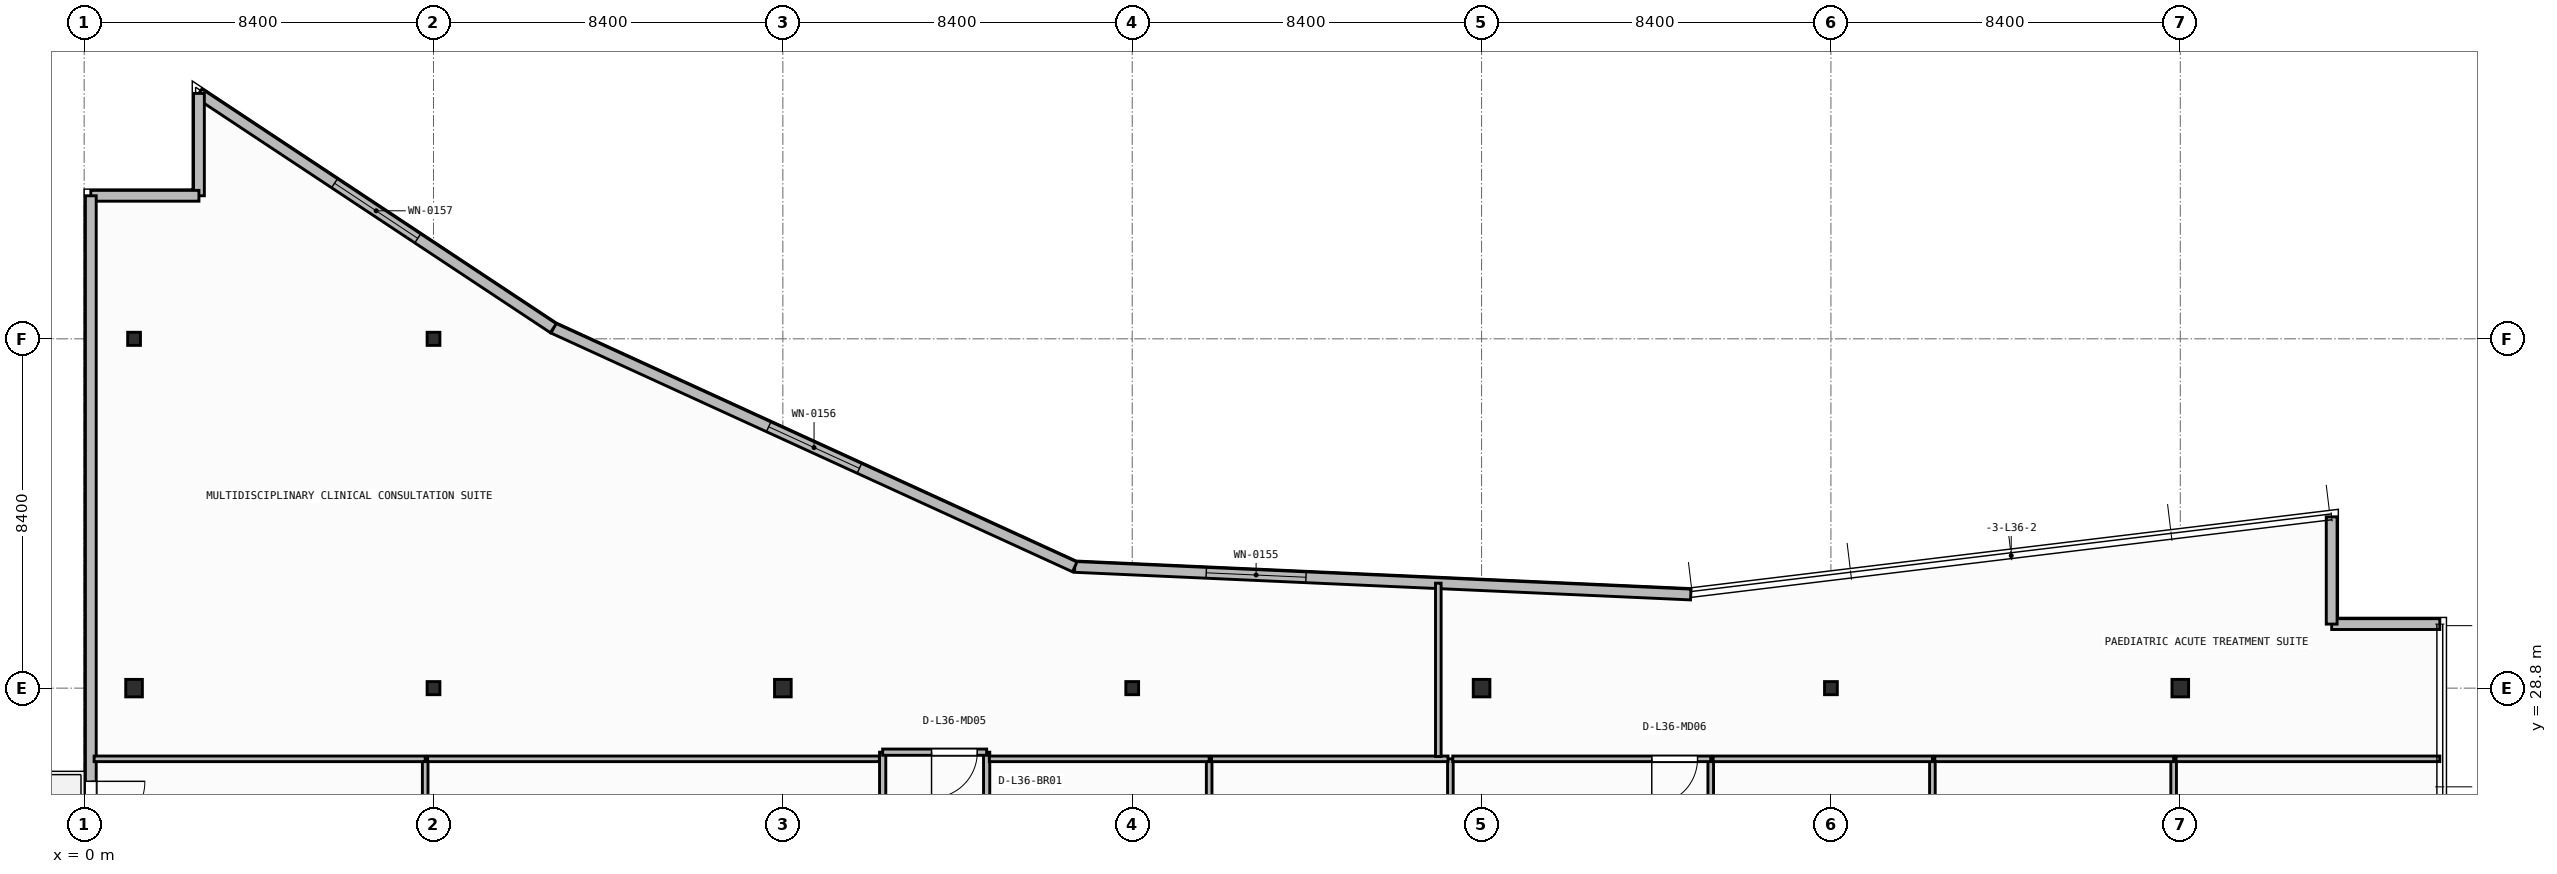
"""IFC4 building model, lengths in metres.
Left out: names, types, materials, properties, quantities, classifications, styles, units other than length and angle.
Written with IfcOpenShell. Run it as: python <this file> out.ifc"""

import sys

from ifc_helpers import new_model, si_unit, direction, frame, frame_2d, origin, origin_2d, place, context, subcontext, project, spatial, rectangle, i_section, extrude, element, fill, save


model = new_model("IFC4")
c1 = context("Model", 3, precision=1e-05, world=origin(), true_north=direction((0.0, 1.0)))
c2 = subcontext(c1, "Body", "Model", "MODEL_VIEW")
j1 = project(units=[si_unit("LENGTHUNIT", "METRE"), si_unit("PLANEANGLEUNIT", "RADIAN")], contexts=[c1])
p1 = place(None, origin())
s1 = spatial("IfcSite", under=j1, at=p1, CompositionType="ELEMENT")
p2 = place(p1, origin())
s2 = spatial("IfcBuilding", under=s1, at=p2, CompositionType="ELEMENT")
p3 = place(p2, frame((0.0, 0.0, 146.8)))
s3 = spatial("IfcBuildingStorey", under=s2, at=p3, CompositionType="ELEMENT", Elevation=146.8)
p4 = place(p3, frame((1.2, 28.8, 0.0), z_axis=(0.0, 0.0, 1.0), x_axis=(1.0, 0.0, 0.0)))
e1 = element("IfcColumn", 1, at=p4, inside=s3, PredefinedType="COLUMN", context=c2, shape_type="SweptSolid", body=[
    extrude(i_section(OverallWidth=0.4, OverallDepth=0.42, WebThickness=0.025, FlangeThickness=0.04, at=origin_2d()), origin(), (0.0, 0.0, 1.0), 3.95),
])
p5 = place(p3, frame((8.4, 28.8, 0.0), z_axis=(0.0, 0.0, 1.0), x_axis=(1.0, 0.0, 0.0)))
e2 = element("IfcColumn", 2, at=p5, inside=s3, PredefinedType="COLUMN", context=c2, shape_type="SweptSolid", body=[
    extrude(i_section(OverallWidth=0.307, OverallDepth=0.315, WebThickness=0.012, FlangeThickness=0.019, FilletRadius=0.017, at=origin_2d()), origin(), (0.0, 0.0, 1.0), 3.95),
])
p6 = place(p3, frame((16.8, 28.8, 0.0), z_axis=(0.0, 0.0, 1.0), x_axis=(1.0, 0.0, 0.0)))
e3 = element("IfcColumn", 3, at=p6, inside=s3, PredefinedType="COLUMN", context=c2, shape_type="SweptSolid", body=[
    extrude(i_section(OverallWidth=0.4, OverallDepth=0.42, WebThickness=0.025, FlangeThickness=0.04, at=origin_2d()), origin(), (0.0, 0.0, 1.0), 3.95),
])
p7 = place(p3, frame((25.2, 28.8, 0.0), z_axis=(0.0, 0.0, 1.0), x_axis=(1.0, 0.0, 0.0)))
e4 = element("IfcColumn", 4, at=p7, inside=s3, PredefinedType="COLUMN", context=c2, shape_type="SweptSolid", body=[
    extrude(i_section(OverallWidth=0.307, OverallDepth=0.315, WebThickness=0.012, FlangeThickness=0.019, FilletRadius=0.017, at=origin_2d()), origin(), (0.0, 0.0, 1.0), 3.95),
])
p8 = place(p3, frame((33.6, 28.8, 0.0), z_axis=(0.0, 0.0, 1.0), x_axis=(1.0, 0.0, 0.0)))
e5 = element("IfcColumn", 5, at=p8, inside=s3, PredefinedType="COLUMN", context=c2, shape_type="SweptSolid", body=[
    extrude(i_section(OverallWidth=0.4, OverallDepth=0.42, WebThickness=0.025, FlangeThickness=0.04, at=origin_2d()), origin(), (0.0, 0.0, 1.0), 3.95),
])
p9 = place(p3, frame((42.0, 28.8, 0.0), z_axis=(0.0, 0.0, 1.0), x_axis=(1.0, 0.0, 0.0)))
e6 = element("IfcColumn", 6, at=p9, inside=s3, PredefinedType="COLUMN", context=c2, shape_type="SweptSolid", body=[
    extrude(i_section(OverallWidth=0.307, OverallDepth=0.315, WebThickness=0.012, FlangeThickness=0.019, FilletRadius=0.017, at=origin_2d()), origin(), (0.0, 0.0, 1.0), 3.95),
])
p10 = place(p3, frame((50.4, 28.8, 0.0), z_axis=(0.0, 0.0, 1.0), x_axis=(1.0, 0.0, 0.0)))
e7 = element("IfcColumn", 7, at=p10, inside=s3, PredefinedType="COLUMN", context=c2, shape_type="SweptSolid", body=[
    extrude(i_section(OverallWidth=0.4, OverallDepth=0.42, WebThickness=0.025, FlangeThickness=0.04, at=origin_2d()), origin(), (0.0, 0.0, 1.0), 3.95),
])
for number, where, z_axis, x_axis in (
    (8, (1.2, 37.2, 0.0), (0.0, 0.0, 1.0), (1.0, 0.0, 0.0)),
    (9, (8.4, 37.2, 0.0), (0.0, 0.0, 1.0), (1.0, 0.0, 0.0)),
):
    element("IfcColumn", number, at=place(p3, frame(where, z_axis=z_axis, x_axis=x_axis)), inside=s3, PredefinedType="COLUMN", context=c2, shape_type="SweptSolid", body=[
        extrude(i_section(OverallWidth=0.307, OverallDepth=0.315, WebThickness=0.012, FlangeThickness=0.019, FilletRadius=0.017, at=origin_2d()), origin(), (0.0, 0.0, 1.0), 3.95),
    ])
p11 = place(p3, frame((56.64, 30.34, 0.0), z_axis=(0.0, 0.0, 1.0), x_axis=(-1.0, 0.0, 0.0)))
e10 = element("IfcWall", 10, at=p11, inside=s3, PredefinedType="STANDARD", context=c2, shape_type="SweptSolid", body=[
    extrude(rectangle(XDim=2.6, YDim=0.26, at=frame_2d((1.3, 0.0))), origin(), (0.0, 0.0, 1.0), 3.71),
])
p12 = place(p3, frame((54.04, 30.34, 0.0), z_axis=(0.0, 0.0, 1.0), x_axis=(0.0, 1.0, 0.0)))
e11 = element("IfcWall", 11, at=p12, inside=s3, PredefinedType="STANDARD", context=c2, shape_type="SweptSolid", body=[
    extrude(rectangle(XDim=2.579, YDim=0.26, at=frame_2d((1.29, 0.0))), origin(), (0.0, 0.0, 1.0), 3.71),
])
p13 = place(p3, frame((38.63, 31.052, 0.0), z_axis=(0.0, 0.0, 1.0), x_axis=(-0.998996592956, 0.044786239663, 0.0)))
e12 = element("IfcWall", 12, at=p13, inside=s3, PredefinedType="STANDARD", context=c2, shape_type="SweptSolid", body=[
    extrude(rectangle(XDim=14.827, YDim=0.26, at=frame_2d((7.414, 0.0))), origin(), (0.0, 0.0, 1.0), 3.71),
])
p14 = place(p13, frame((9.262, 0.0, 0.9)))
e13 = element("IfcOpeningElement", 13, at=p14, cuts=e12, PredefinedType="OPENING", context=c2, shape_type="SweptSolid", body=[
    extrude(rectangle(XDim=2.4, YDim=1.65, at=frame_2d((1.2, 0.825))), frame((0.0, 0.14, 0.0), z_axis=(0.0, -1.0, 0.0), x_axis=(1.0, 0.0, 0.0)), (0.0, 0.0, 1.0), 0.28),
])
p15 = place(p3, frame((23.818, 31.716, 0.0), z_axis=(0.0, 0.0, 1.0), x_axis=(-0.909209527513, 0.416338846471, 0.0)))
e14 = element("IfcWall", 14, at=p15, inside=s3, PredefinedType="STANDARD", context=c2, shape_type="SweptSolid", body=[
    extrude(rectangle(XDim=13.787, YDim=0.26, at=frame_2d((6.894, 0.0))), origin(), (0.0, 0.0, 1.0), 3.71),
])
p16 = place(p15, frame((5.694, 0.0, 0.9)))
e15 = element("IfcOpeningElement", 15, at=p16, cuts=e14, PredefinedType="OPENING", context=c2, shape_type="SweptSolid", body=[
    extrude(rectangle(XDim=2.4, YDim=1.65, at=frame_2d((1.2, 0.825))), frame((0.0, 0.14, 0.0), z_axis=(0.0, -1.0, 0.0), x_axis=(1.0, 0.0, 0.0)), (0.0, 0.0, 1.0), 0.28),
])
p17 = place(p3, frame((11.282, 37.456, 0.0), z_axis=(0.0, 0.0, 1.0), x_axis=(-0.833630474253, 0.552322580017, 0.0)))
e16 = element("IfcWall", 16, at=p17, inside=s3, PredefinedType="STANDARD", context=c2, shape_type="SweptSolid", body=[
    extrude(rectangle(XDim=10.223, YDim=0.26, at=frame_2d((5.111, 0.0))), origin(), (0.0, 0.0, 1.0), 3.71),
])
p18 = place(p17, frame((3.911, 0.0, 0.9)))
e17 = element("IfcOpeningElement", 17, at=p18, cuts=e16, PredefinedType="OPENING", context=c2, shape_type="SweptSolid", body=[
    extrude(rectangle(XDim=2.4, YDim=1.65, at=frame_2d((1.2, 0.825))), frame((0.0, 0.14, 0.0), z_axis=(0.0, -1.0, 0.0), x_axis=(1.0, 0.0, 0.0)), (0.0, 0.0, 1.0), 0.28),
])
p19 = place(p3, frame((2.76, 43.102, 0.0), z_axis=(0.0, 0.0, 1.0), x_axis=(0.0, -1.0, 0.0)))
e18 = element("IfcWall", 18, at=p19, inside=s3, PredefinedType="STANDARD", context=c2, shape_type="SweptSolid", body=[
    extrude(rectangle(XDim=2.462, YDim=0.26, at=frame_2d((1.231, 0.0))), origin(), (0.0, 0.0, 1.0), 3.71),
])
p20 = place(p3, frame((2.76, 40.64, 0.0), z_axis=(0.0, 0.0, 1.0), x_axis=(-1.0, 0.0, 0.0)))
e19 = element("IfcWall", 19, at=p20, inside=s3, PredefinedType="STANDARD", context=c2, shape_type="SweptSolid", body=[
    extrude(rectangle(XDim=2.6, YDim=0.26, at=frame_2d((1.3, 0.0))), origin(), (0.0, 0.0, 1.0), 3.71),
])
p21 = place(p3, frame((0.16, 40.64, 0.0), z_axis=(0.0, 0.0, 1.0), x_axis=(0.0, -1.0, 0.0)))
e20 = element("IfcWall", 20, at=p21, inside=s3, PredefinedType="STANDARD", context=c2, shape_type="SweptSolid", body=[
    extrude(rectangle(XDim=37.88, YDim=0.26, at=frame_2d((18.94, 0.0))), origin(), (0.0, 0.0, 1.0), 3.71),
])
p22 = place(p21, frame((14.081, 0.0, 0.0)))
e21 = element("IfcOpeningElement", 21, at=p22, cuts=e20, PredefinedType="OPENING", context=c2, shape_type="SweptSolid", body=[
    extrude(rectangle(XDim=1.3, YDim=2.15, at=frame_2d((0.65, 1.075))), frame((0.0, 0.14, 0.0), z_axis=(0.0, -1.0, 0.0), x_axis=(1.0, 0.0, 0.0)), (0.0, 0.0, 1.0), 0.28),
])
p23 = place(p3, frame((19.2, 27.26, 0.0), z_axis=(0.0, 0.0, 1.0), x_axis=(0.0, -1.0, 0.0)))
e22 = element("IfcWall", 22, at=p23, inside=s3, PredefinedType="PARTITIONING", context=c2, shape_type="SweptSolid", body=[
    extrude(rectangle(XDim=12.56, YDim=0.15, at=frame_2d((6.28, 0.0))), origin(), (0.0, 0.0, 1.0), 3.71),
])
p24 = place(p3, frame((21.7, 23.784, 0.0), z_axis=(0.0, 0.0, 1.0), x_axis=(0.0, 1.0, 0.0)))
e23 = element("IfcWall", 23, at=p24, inside=s3, PredefinedType="PARTITIONING", context=c2, shape_type="SweptSolid", body=[
    extrude(rectangle(XDim=3.476, YDim=0.15, at=frame_2d((1.738, 0.0))), origin(), (0.0, 0.0, 1.0), 3.71),
])
p25 = place(p24, frame((1.088, 0.0, 0.0)))
e24 = element("IfcOpeningElement", 24, at=p25, cuts=e23, PredefinedType="OPENING", context=c2, shape_type="SweptSolid", body=[
    extrude(rectangle(XDim=1.3, YDim=2.15, at=frame_2d((0.65, 1.075))), frame((0.0, 0.085, 0.0), z_axis=(0.0, -1.0, 0.0), x_axis=(1.0, 0.0, 0.0)), (0.0, 0.0, 1.0), 0.17),
])
p26 = place(p3, frame((21.7, 27.26, 0.0), z_axis=(0.0, 0.0, 1.0), x_axis=(-1.0, 0.0, 0.0)))
e25 = element("IfcWall", 25, at=p26, inside=s3, PredefinedType="PARTITIONING", context=c2, shape_type="SweptSolid", body=[
    extrude(rectangle(XDim=2.5, YDim=0.15, at=frame_2d((1.25, 0.0))), origin(), (0.0, 0.0, 1.0), 3.71),
])
p27 = place(p26, frame((0.225, 0.0, 0.0)))
e26 = element("IfcOpeningElement", 26, at=p27, cuts=e25, PredefinedType="OPENING", context=c2, shape_type="SweptSolid", body=[
    extrude(rectangle(XDim=1.1, YDim=2.1, at=frame_2d((0.55, 1.05))), frame((0.0, 0.085, 0.0), z_axis=(0.0, -1.0, 0.0), x_axis=(1.0, 0.0, 0.0)), (0.0, 0.0, 1.0), 0.17),
])
p28 = place(p3, frame((8.2, 14.76, 0.0), z_axis=(0.0, 0.0, 1.0), x_axis=(0.0, 1.0, 0.0)))
e27 = element("IfcWall", 27, at=p28, inside=s3, PredefinedType="PARTITIONING", context=c2, shape_type="SweptSolid", body=[
    extrude(rectangle(XDim=12.34, YDim=0.135, at=frame_2d((6.17, 0.0))), origin(), (0.0, 0.0, 1.0), 3.152),
])
p29 = place(p3, frame((8.2, 27.1, 0.0), z_axis=(0.0, 0.0, 1.0), x_axis=(-1.0, 0.0, 0.0)))
e28 = element("IfcWall", 28, at=p29, inside=s3, PredefinedType="PARTITIONING", context=c2, shape_type="SweptSolid", body=[
    extrude(rectangle(XDim=7.96, YDim=0.135, at=frame_2d((3.98, 0.0))), origin(), (0.0, 0.0, 1.0), 3.71),
])
p30 = place(p3, frame((19.12, 27.1, 0.0), z_axis=(0.0, 0.0, 1.0), x_axis=(-1.0, 0.0, 0.0)))
e29 = element("IfcWall", 29, at=p30, inside=s3, PredefinedType="PARTITIONING", context=c2, shape_type="SweptSolid", body=[
    extrude(rectangle(XDim=10.863, YDim=0.135, at=frame_2d((5.431, 0.0))), origin(), (0.0, 0.0, 1.0), 3.71),
])
p31 = place(p3, frame((27.05, 23.802, 0.0), z_axis=(0.0, 0.0, 1.0), x_axis=(0.0, 1.0, 0.0)))
e30 = element("IfcWall", 30, at=p31, inside=s3, PredefinedType="PARTITIONING", context=c2, shape_type="SweptSolid", body=[
    extrude(rectangle(XDim=3.298, YDim=0.135, at=frame_2d((1.649, 0.0))), origin(), (0.0, 0.0, 1.0), 3.71),
])
p32 = place(p3, frame((27.05, 27.1, 0.0), z_axis=(0.0, 0.0, 1.0), x_axis=(-1.0, 0.0, 0.0)))
e31 = element("IfcWall", 31, at=p32, inside=s3, PredefinedType="PARTITIONING", context=c2, shape_type="SweptSolid", body=[
    extrude(rectangle(XDim=5.285, YDim=0.135, at=frame_2d((2.643, 0.0))), origin(), (0.0, 0.0, 1.0), 3.71),
])
p33 = place(p3, frame((32.85, 20.715, 0.0), z_axis=(0.0, 0.0, 1.0), x_axis=(0.0, 1.0, 0.0)))
e32 = element("IfcWall", 32, at=p33, inside=s3, PredefinedType="PARTITIONING", context=c2, shape_type="SweptSolid", body=[
    extrude(rectangle(XDim=6.385, YDim=0.135, at=frame_2d((3.192, 0.0))), origin(), (0.0, 0.0, 1.0), 3.71),
])
p34 = place(p3, frame((32.792, 27.1, 0.0), z_axis=(0.0, 0.0, 1.0), x_axis=(-1.0, 0.0, 0.0)))
e33 = element("IfcWall", 33, at=p34, inside=s3, PredefinedType="PARTITIONING", context=c2, shape_type="SweptSolid", body=[
    extrude(rectangle(XDim=5.685, YDim=0.135, at=frame_2d((2.843, 0.0))), origin(), (0.0, 0.0, 1.0), 3.71),
])
p35 = place(p3, frame((39.11, 23.802, 0.0), z_axis=(0.0, 0.0, 1.0), x_axis=(0.0, 1.0, 0.0)))
e34 = element("IfcWall", 34, at=p35, inside=s3, PredefinedType="PARTITIONING", context=c2, shape_type="SweptSolid", body=[
    extrude(rectangle(XDim=3.298, YDim=0.135, at=frame_2d((1.649, 0.0))), origin(), (0.0, 0.0, 1.0), 3.71),
])
p36 = place(p3, frame((39.11, 27.1, 0.0), z_axis=(0.0, 0.0, 1.0), x_axis=(-1.0, 0.0, 0.0)))
e35 = element("IfcWall", 35, at=p36, inside=s3, PredefinedType="PARTITIONING", context=c2, shape_type="SweptSolid", body=[
    extrude(rectangle(XDim=6.203, YDim=0.135, at=frame_2d((3.101, 0.0))), origin(), (0.0, 0.0, 1.0), 3.71),
])
p37 = place(p36, frame((0.318, 0.0, 0.0)))
e36 = element("IfcOpeningElement", 36, at=p37, cuts=e35, PredefinedType="OPENING", context=c2, shape_type="SweptSolid", body=[
    extrude(rectangle(XDim=1.1, YDim=2.1, at=frame_2d((0.55, 1.05))), frame((0.0, 0.077, 0.0), z_axis=(0.0, -1.0, 0.0), x_axis=(1.0, 0.0, 0.0)), (0.0, 0.0, 1.0), 0.155),
])
p38 = place(p3, frame((44.44, 23.802, 0.0), z_axis=(0.0, 0.0, 1.0), x_axis=(0.0, 1.0, 0.0)))
e37 = element("IfcWall", 37, at=p38, inside=s3, PredefinedType="PARTITIONING", context=c2, shape_type="SweptSolid", body=[
    extrude(rectangle(XDim=3.298, YDim=0.135, at=frame_2d((1.649, 0.0))), origin(), (0.0, 0.0, 1.0), 3.71),
])
p39 = place(p3, frame((44.44, 27.1, 0.0), z_axis=(0.0, 0.0, 1.0), x_axis=(-1.0, 0.0, 0.0)))
e38 = element("IfcWall", 38, at=p39, inside=s3, PredefinedType="PARTITIONING", context=c2, shape_type="SweptSolid", body=[
    extrude(rectangle(XDim=5.272, YDim=0.135, at=frame_2d((2.636, 0.0))), origin(), (0.0, 0.0, 1.0), 3.71),
])
p40 = place(p3, frame((50.24, 20.715, 0.0), z_axis=(0.0, 0.0, 1.0), x_axis=(0.0, 1.0, 0.0)))
e39 = element("IfcWall", 39, at=p40, inside=s3, PredefinedType="PARTITIONING", context=c2, shape_type="SweptSolid", body=[
    extrude(rectangle(XDim=6.385, YDim=0.135, at=frame_2d((3.192, 0.0))), origin(), (0.0, 0.0, 1.0), 3.152),
])
p41 = place(p3, frame((50.24, 27.1, 0.0), z_axis=(0.0, 0.0, 1.0), x_axis=(-1.0, 0.0, 0.0)))
e40 = element("IfcWall", 40, at=p41, inside=s3, PredefinedType="PARTITIONING", context=c2, shape_type="SweptSolid", body=[
    extrude(rectangle(XDim=5.742, YDim=0.135, at=frame_2d((2.871, 0.0))), origin(), (0.0, 0.0, 1.0), 3.71),
])
p42 = place(p3, frame((56.64, 27.1, 0.0), z_axis=(0.0, 0.0, 1.0), x_axis=(-1.0, 0.0, 0.0)))
e41 = element("IfcWall", 41, at=p42, inside=s3, PredefinedType="PARTITIONING", context=c2, shape_type="SweptSolid", body=[
    extrude(rectangle(XDim=6.342, YDim=0.135, at=frame_2d((3.171, 0.0))), origin(), (0.0, 0.0, 1.0), 3.71),
])
p43 = place(p3, frame((32.56, 27.157, 0.0), z_axis=(0.0, 0.0, 1.0), x_axis=(0.0, 1.0, 0.0)))
e42 = element("IfcWall", 42, at=p43, inside=s3, PredefinedType="PARTITIONING", context=c2, shape_type="SweptSolid", body=[
    extrude(rectangle(XDim=4.166, YDim=0.135, at=frame_2d((2.083, 0.0))), origin(), (0.0, 0.0, 1.0), 3.71),
])
p44 = place(p14, origin())
e43 = element("IfcWindow", 43, at=p44, inside=s3, PartitioningType="SINGLE_PANEL", PredefinedType="WINDOW", context=c2, shape_type="SweptSolid", body=[
    extrude(rectangle(XDim=2.4, YDim=1.65, at=frame_2d((1.2, 0.825))), frame((0.0, 0.03, 0.0), z_axis=(0.0, -1.0, 0.0), x_axis=(1.0, 0.0, 0.0)), (0.0, 0.0, 1.0), 0.06),
])
fill(e13, e43)
p45 = place(p16, origin())
e44 = element("IfcWindow", 44, at=p45, inside=s3, PartitioningType="SINGLE_PANEL", PredefinedType="WINDOW", context=c2, shape_type="SweptSolid", body=[
    extrude(rectangle(XDim=2.4, YDim=1.65, at=frame_2d((1.2, 0.825))), frame((0.0, 0.03, 0.0), z_axis=(0.0, -1.0, 0.0), x_axis=(1.0, 0.0, 0.0)), (0.0, 0.0, 1.0), 0.06),
])
fill(e15, e44)
p46 = place(p18, origin())
e45 = element("IfcWindow", 45, at=p46, inside=s3, PartitioningType="SINGLE_PANEL", PredefinedType="WINDOW", context=c2, shape_type="SweptSolid", body=[
    extrude(rectangle(XDim=2.4, YDim=1.65, at=frame_2d((1.2, 0.825))), frame((0.0, 0.03, 0.0), z_axis=(0.0, -1.0, 0.0), x_axis=(1.0, 0.0, 0.0)), (0.0, 0.0, 1.0), 0.06),
])
fill(e17, e45)
p47 = place(p22, origin())
e46 = element("IfcDoor", 46, at=p47, inside=s3, OperationType="SINGLE_SWING_LEFT", PredefinedType="DOOR", context=c2, shape_type="SweptSolid", body=[
    extrude(rectangle(XDim=1.3, YDim=2.15, at=frame_2d((0.65, 1.075))), frame((0.0, 0.025, 0.0), z_axis=(0.0, -1.0, 0.0), x_axis=(1.0, 0.0, 0.0)), (0.0, 0.0, 1.0), 0.05),
])
fill(e21, e46)
p48 = place(p27, origin())
e47 = element("IfcDoor", 47, at=p48, inside=s3, OperationType="SINGLE_SWING_RIGHT", PredefinedType="DOOR", context=c2, shape_type="SweptSolid", body=[
    extrude(rectangle(XDim=1.1, YDim=2.1, at=frame_2d((0.55, 1.05))), frame((0.0, 0.025, 0.0), z_axis=(0.0, -1.0, 0.0), x_axis=(1.0, 0.0, 0.0)), (0.0, 0.0, 1.0), 0.05),
])
fill(e26, e47)
p49 = place(p37, origin())
e48 = element("IfcDoor", 48, at=p49, inside=s3, OperationType="SINGLE_SWING_RIGHT", PredefinedType="DOOR", context=c2, shape_type="SweptSolid", body=[
    extrude(rectangle(XDim=1.1, YDim=2.1, at=frame_2d((0.55, 1.05))), frame((0.0, 0.025, 0.0), z_axis=(0.0, -1.0, 0.0), x_axis=(1.0, 0.0, 0.0)), (0.0, 0.0, 1.0), 0.05),
])
fill(e36, e48)
save(model, sys.argv[1])
